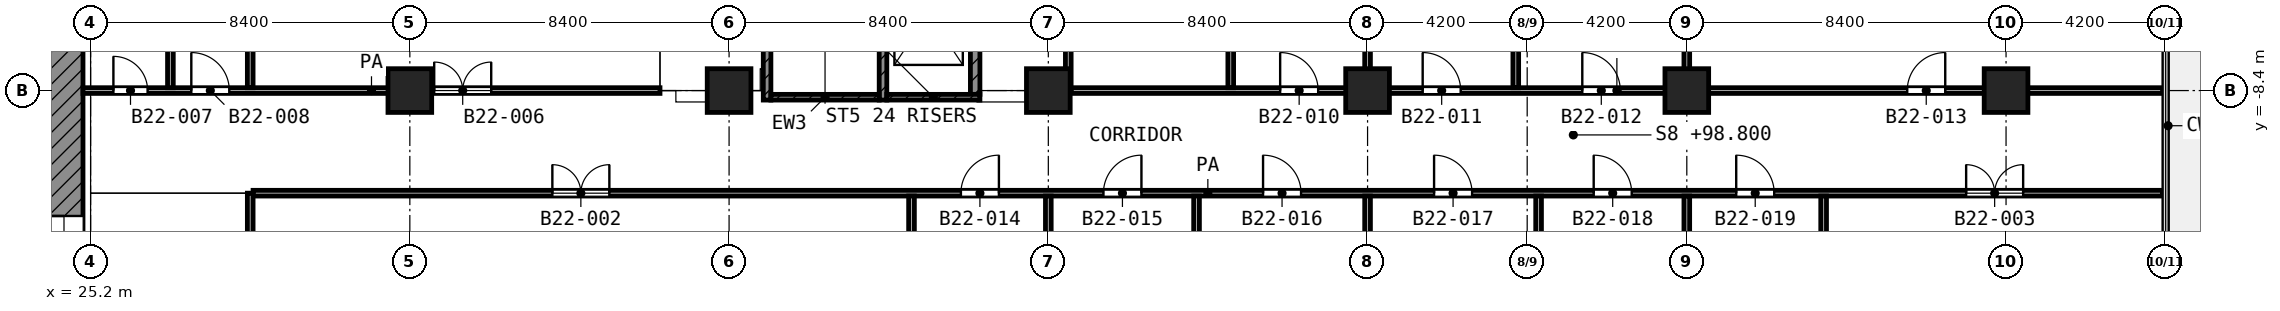
"""IFC4 building model, lengths in metres.
Left out: names, types, materials, properties, quantities, classifications, styles, units other than length and angle.
Written with IfcOpenShell. Run it as: python <this file> out.ifc"""

import sys

from ifc_helpers import new_model, si_unit, direction, frame, frame_2d, origin, origin_2d, place, context, subcontext, project, spatial, rectangle, extrude, element, fill, save


model = new_model("IFC4")
c1 = context("Model", 3, precision=1e-05, world=origin(), true_north=direction((0.0, 1.0)))
c2 = subcontext(c1, "Body", "Model", "MODEL_VIEW")
j1 = project(units=[si_unit("LENGTHUNIT", "METRE"), si_unit("PLANEANGLEUNIT", "RADIAN")], contexts=[c1])
p1 = place(None, origin())
s1 = spatial("IfcSite", under=j1, at=p1, CompositionType="ELEMENT")
p2 = place(p1, origin())
s2 = spatial("IfcBuilding", under=s1, at=p2, CompositionType="ELEMENT")
p3 = place(p2, frame((0.0, 0.0, 98.8)))
s3 = spatial("IfcBuildingStorey", under=s2, at=p3, CompositionType="ELEMENT", Elevation=98.8)
for number, where, z_axis, x_axis in (
    (1, (33.6, -8.4, 0.0), (0.0, 0.0, 1.0), (1.0, 0.0, 0.0)),
    (2, (42.0, -8.4, 0.0), (0.0, 0.0, 1.0), (1.0, 0.0, 0.0)),
    (3, (50.4, -8.4, 0.0), (0.0, 0.0, 1.0), (1.0, 0.0, 0.0)),
    (4, (58.8, -8.4, 0.0), (0.0, 0.0, 1.0), (1.0, 0.0, 0.0)),
    (5, (67.2, -8.4, 0.0), (0.0, 0.0, 1.0), (1.0, 0.0, 0.0)),
    (6, (75.6, -8.4, 0.0), (0.0, 0.0, 1.0), (1.0, 0.0, 0.0)),
):
    element("IfcColumn", number, at=place(p3, frame(where, z_axis=z_axis, x_axis=x_axis)), inside=s3, PredefinedType="COLUMN", context=c2, shape_type="SweptSolid", body=[
        extrude(rectangle(XDim=1.15, YDim=1.15, at=origin_2d()), origin(), (0.0, 0.0, 1.0), 4.2),
    ])
p4 = place(p3, frame((24.5, -24.0, 0.0), z_axis=(0.0, 0.0, 1.0), x_axis=(0.0, 1.0, 0.0)))
e7 = element("IfcWall", 7, at=p4, inside=s3, PredefinedType="SHEAR", context=c2, shape_type="SweptSolid", body=[
    extrude(rectangle(XDim=18.6, YDim=1.0, at=frame_2d((9.3, 0.0))), origin(), (0.0, 0.0, 1.0), 3.6),
])
p5 = place(p4, frame((10.5, 0.0, 0.0)))
e8 = element("IfcOpeningElement", 8, at=p5, cuts=e7, PredefinedType="OPENING", context=c2, shape_type="SweptSolid", body=[
    extrude(rectangle(XDim=1.8, YDim=2.1, at=frame_2d((0.9, 1.05))), frame((0.0, 0.51, 0.0), z_axis=(0.0, -1.0, 0.0), x_axis=(1.0, 0.0, 0.0)), (0.0, 0.0, 1.0), 1.02),
])
p6 = place(p3, frame((43.0, -8.65, 0.0), z_axis=(0.0, 0.0, 1.0), x_axis=(0.0, 1.0, 0.0)))
e9 = element("IfcWall", 9, at=p6, inside=s3, PredefinedType="SHEAR", context=c2, shape_type="SweptSolid", body=[
    extrude(rectangle(XDim=8.35, YDim=0.2, at=frame_2d((4.175, 0.0))), origin(), (0.0, 0.0, 1.0), 3.6),
])
p7 = place(p6, frame((7.0, 0.0, 0.0)))
e10 = element("IfcOpeningElement", 10, at=p7, cuts=e9, PredefinedType="OPENING", context=c2, shape_type="SweptSolid", body=[
    extrude(rectangle(XDim=1.1, YDim=2.1, at=frame_2d((0.55, 1.05))), frame((0.0, 0.11, 0.0), z_axis=(0.0, -1.0, 0.0), x_axis=(1.0, 0.0, 0.0)), (0.0, 0.0, 1.0), 0.22),
])
p8 = place(p3, frame((46.05, -8.65, 0.0), z_axis=(0.0, 0.0, 1.0), x_axis=(0.0, 1.0, 0.0)))
e11 = element("IfcWall", 11, at=p8, inside=s3, PredefinedType="SHEAR", context=c2, shape_type="SweptSolid", body=[
    extrude(rectangle(XDim=8.35, YDim=0.2, at=frame_2d((4.175, 0.0))), origin(), (0.0, 0.0, 1.0), 3.6),
])
p9 = place(p8, frame((7.0, 0.0, 0.0)))
e12 = element("IfcOpeningElement", 12, at=p9, cuts=e11, PredefinedType="OPENING", context=c2, shape_type="SweptSolid", body=[
    extrude(rectangle(XDim=1.1, YDim=2.1, at=frame_2d((0.55, 1.05))), frame((0.0, 0.11, 0.0), z_axis=(0.0, -1.0, 0.0), x_axis=(1.0, 0.0, 0.0)), (0.0, 0.0, 1.0), 0.22),
])
p10 = place(p3, frame((43.1, -8.575, 0.0), z_axis=(0.0, 0.0, 1.0), x_axis=(1.0, 0.0, 0.0)))
e13 = element("IfcWall", 13, at=p10, inside=s3, PredefinedType="SHEAR", context=c2, shape_type="SweptSolid", body=[
    extrude(rectangle(XDim=2.85, YDim=0.15, at=frame_2d((1.425, 0.0))), origin(), (0.0, 0.0, 1.0), 3.6),
])
p11 = place(p3, frame((46.15, -8.575, 0.0), z_axis=(0.0, 0.0, 1.0), x_axis=(1.0, 0.0, 0.0)))
e14 = element("IfcWall", 14, at=p11, inside=s3, PredefinedType="SHEAR", context=c2, shape_type="SweptSolid", body=[
    extrude(rectangle(XDim=2.45, YDim=0.15, at=frame_2d((1.225, 0.0))), origin(), (0.0, 0.0, 1.0), 3.6),
])
p12 = place(p3, frame((48.475, -8.5, 0.0), z_axis=(0.0, 0.0, 1.0), x_axis=(0.0, 1.0, 0.0)))
e15 = element("IfcWall", 15, at=p12, inside=s3, PredefinedType="SHEAR", context=c2, shape_type="SweptSolid", body=[
    extrude(rectangle(XDim=3.475, YDim=0.25, at=frame_2d((1.738, 0.0))), origin(), (0.0, 0.0, 1.0), 3.6),
])
p13 = place(p3, frame((29.475, -11.1, 0.0), z_axis=(0.0, 0.0, 1.0), x_axis=(1.0, 0.0, 0.0)))
e16 = element("IfcWall", 16, at=p13, inside=s3, PredefinedType="PARTITIONING", context=c2, shape_type="SweptSolid", body=[
    extrude(rectangle(XDim=50.245, YDim=0.15, at=frame_2d((25.123, 0.0))), origin(), (0.0, 0.0, 1.0), 3.6),
])
p14 = place(p13, frame((7.875, 0.0, 0.0)))
e17 = element("IfcOpeningElement", 17, at=p14, cuts=e16, PredefinedType="OPENING", context=c2, shape_type="SweptSolid", body=[
    extrude(rectangle(XDim=1.5, YDim=2.1, at=frame_2d((0.75, 1.05))), frame((0.0, 0.085, 0.0), z_axis=(0.0, -1.0, 0.0), x_axis=(1.0, 0.0, 0.0)), (0.0, 0.0, 1.0), 0.17),
])
p15 = place(p13, frame((18.625, 0.0, 0.0)))
e18 = element("IfcOpeningElement", 18, at=p15, cuts=e16, PredefinedType="OPENING", context=c2, shape_type="SweptSolid", body=[
    extrude(rectangle(XDim=1.0, YDim=2.1, at=frame_2d((0.5, 1.05))), frame((0.0, 0.085, 0.0), z_axis=(0.0, -1.0, 0.0), x_axis=(1.0, 0.0, 0.0)), (0.0, 0.0, 1.0), 0.17),
])
p16 = place(p13, frame((22.375, 0.0, 0.0)))
e19 = element("IfcOpeningElement", 19, at=p16, cuts=e16, PredefinedType="OPENING", context=c2, shape_type="SweptSolid", body=[
    extrude(rectangle(XDim=1.0, YDim=2.1, at=frame_2d((0.5, 1.05))), frame((0.0, 0.085, 0.0), z_axis=(0.0, -1.0, 0.0), x_axis=(1.0, 0.0, 0.0)), (0.0, 0.0, 1.0), 0.17),
])
p17 = place(p13, frame((26.575, 0.0, 0.0)))
e20 = element("IfcOpeningElement", 20, at=p17, cuts=e16, PredefinedType="OPENING", context=c2, shape_type="SweptSolid", body=[
    extrude(rectangle(XDim=1.0, YDim=2.1, at=frame_2d((0.5, 1.05))), frame((0.0, 0.085, 0.0), z_axis=(0.0, -1.0, 0.0), x_axis=(1.0, 0.0, 0.0)), (0.0, 0.0, 1.0), 0.17),
])
p18 = place(p13, frame((31.075, 0.0, 0.0)))
e21 = element("IfcOpeningElement", 21, at=p18, cuts=e16, PredefinedType="OPENING", context=c2, shape_type="SweptSolid", body=[
    extrude(rectangle(XDim=1.0, YDim=2.1, at=frame_2d((0.5, 1.05))), frame((0.0, 0.085, 0.0), z_axis=(0.0, -1.0, 0.0), x_axis=(1.0, 0.0, 0.0)), (0.0, 0.0, 1.0), 0.17),
])
p19 = place(p13, frame((35.275, 0.0, 0.0)))
e22 = element("IfcOpeningElement", 22, at=p19, cuts=e16, PredefinedType="OPENING", context=c2, shape_type="SweptSolid", body=[
    extrude(rectangle(XDim=1.0, YDim=2.1, at=frame_2d((0.5, 1.05))), frame((0.0, 0.085, 0.0), z_axis=(0.0, -1.0, 0.0), x_axis=(1.0, 0.0, 0.0)), (0.0, 0.0, 1.0), 0.17),
])
p20 = place(p13, frame((39.025, 0.0, 0.0)))
e23 = element("IfcOpeningElement", 23, at=p20, cuts=e16, PredefinedType="OPENING", context=c2, shape_type="SweptSolid", body=[
    extrude(rectangle(XDim=1.0, YDim=2.1, at=frame_2d((0.5, 1.05))), frame((0.0, 0.085, 0.0), z_axis=(0.0, -1.0, 0.0), x_axis=(1.0, 0.0, 0.0)), (0.0, 0.0, 1.0), 0.17),
])
p21 = place(p13, frame((45.075, 0.0, 0.0)))
e24 = element("IfcOpeningElement", 24, at=p21, cuts=e16, PredefinedType="OPENING", context=c2, shape_type="SweptSolid", body=[
    extrude(rectangle(XDim=1.5, YDim=2.1, at=frame_2d((0.75, 1.05))), frame((0.0, 0.085, 0.0), z_axis=(0.0, -1.0, 0.0), x_axis=(1.0, 0.0, 0.0)), (0.0, 0.0, 1.0), 0.17),
])
p22 = place(p3, frame((25.0, -8.4, 0.0), z_axis=(0.0, 0.0, 1.0), x_axis=(1.0, 0.0, 0.0)))
e25 = element("IfcWall", 25, at=p22, inside=s3, PredefinedType="PARTITIONING", context=c2, shape_type="SweptSolid", body=[
    extrude(rectangle(XDim=15.182, YDim=0.15, at=frame_2d((7.591, 0.0))), origin(), (0.0, 0.0, 1.0), 3.6),
])
p23 = place(p22, frame((0.8, 0.0, 0.0)))
e26 = element("IfcOpeningElement", 26, at=p23, cuts=e25, PredefinedType="OPENING", context=c2, shape_type="SweptSolid", body=[
    extrude(rectangle(XDim=0.9, YDim=2.1, at=frame_2d((0.45, 1.05))), frame((0.0, 0.085, 0.0), z_axis=(0.0, -1.0, 0.0), x_axis=(1.0, 0.0, 0.0)), (0.0, 0.0, 1.0), 0.17),
])
p24 = place(p22, frame((2.85, 0.0, 0.0)))
e27 = element("IfcOpeningElement", 27, at=p24, cuts=e25, PredefinedType="OPENING", context=c2, shape_type="SweptSolid", body=[
    extrude(rectangle(XDim=1.0, YDim=2.1, at=frame_2d((0.5, 1.05))), frame((0.0, 0.085, 0.0), z_axis=(0.0, -1.0, 0.0), x_axis=(1.0, 0.0, 0.0)), (0.0, 0.0, 1.0), 0.17),
])
p25 = place(p22, frame((9.241, 0.0, 0.0)))
e28 = element("IfcOpeningElement", 28, at=p25, cuts=e25, PredefinedType="OPENING", context=c2, shape_type="SweptSolid", body=[
    extrude(rectangle(XDim=1.5, YDim=2.1, at=frame_2d((0.75, 1.05))), frame((0.0, 0.085, 0.0), z_axis=(0.0, -1.0, 0.0), x_axis=(1.0, 0.0, 0.0)), (0.0, 0.0, 1.0), 0.17),
])
p26 = place(p3, frame((51.0, -8.4, 0.0), z_axis=(0.0, 0.0, 1.0), x_axis=(1.0, 0.0, 0.0)))
e29 = element("IfcWall", 29, at=p26, inside=s3, PredefinedType="PARTITIONING", context=c2, shape_type="SweptSolid", body=[
    extrude(rectangle(XDim=28.72, YDim=0.15, at=frame_2d((14.36, 0.0))), origin(), (0.0, 0.0, 1.0), 3.6),
])
p27 = place(p26, frame((5.5, 0.0, 0.0)))
e30 = element("IfcOpeningElement", 30, at=p27, cuts=e29, PredefinedType="OPENING", context=c2, shape_type="SweptSolid", body=[
    extrude(rectangle(XDim=1.0, YDim=2.1, at=frame_2d((0.5, 1.05))), frame((0.0, 0.085, 0.0), z_axis=(0.0, -1.0, 0.0), x_axis=(1.0, 0.0, 0.0)), (0.0, 0.0, 1.0), 0.17),
])
p28 = place(p26, frame((9.25, 0.0, 0.0)))
e31 = element("IfcOpeningElement", 31, at=p28, cuts=e29, PredefinedType="OPENING", context=c2, shape_type="SweptSolid", body=[
    extrude(rectangle(XDim=1.0, YDim=2.1, at=frame_2d((0.5, 1.05))), frame((0.0, 0.085, 0.0), z_axis=(0.0, -1.0, 0.0), x_axis=(1.0, 0.0, 0.0)), (0.0, 0.0, 1.0), 0.17),
])
p29 = place(p26, frame((13.45, 0.0, 0.0)))
e32 = element("IfcOpeningElement", 32, at=p29, cuts=e29, PredefinedType="OPENING", context=c2, shape_type="SweptSolid", body=[
    extrude(rectangle(XDim=1.0, YDim=2.1, at=frame_2d((0.5, 1.05))), frame((0.0, 0.085, 0.0), z_axis=(0.0, -1.0, 0.0), x_axis=(1.0, 0.0, 0.0)), (0.0, 0.0, 1.0), 0.17),
])
p30 = place(p26, frame((22.0, 0.0, 0.0)))
e33 = element("IfcOpeningElement", 33, at=p30, cuts=e29, PredefinedType="OPENING", context=c2, shape_type="SweptSolid", body=[
    extrude(rectangle(XDim=1.0, YDim=2.1, at=frame_2d((0.5, 1.05))), frame((0.0, 0.085, 0.0), z_axis=(0.0, -1.0, 0.0), x_axis=(1.0, 0.0, 0.0)), (0.0, 0.0, 1.0), 0.17),
])
p31 = place(p3, frame((27.3, -8.325, 0.0), z_axis=(0.0, 0.0, 1.0), x_axis=(0.0, 1.0, 0.0)))
e34 = element("IfcWall", 34, at=p31, inside=s3, PredefinedType="PARTITIONING", context=c2, shape_type="SweptSolid", body=[
    extrude(rectangle(XDim=8.25, YDim=0.15, at=frame_2d((4.125, 0.0))), origin(), (0.0, 0.0, 1.0), 3.6),
])
p32 = place(p3, frame((29.4, -25.2, 0.0), z_axis=(0.0, 0.0, 1.0), x_axis=(0.0, 1.0, 0.0)))
e35 = element("IfcWall", 35, at=p32, inside=s3, PredefinedType="PARTITIONING", context=c2, shape_type="SweptSolid", body=[
    extrude(rectangle(XDim=14.1, YDim=0.15, at=frame_2d((7.05, 0.0))), origin(), (0.0, 0.0, 1.0), 3.6),
])
p33 = place(p3, frame((29.4, -8.325, 0.0), z_axis=(0.0, 0.0, 1.0), x_axis=(0.0, 1.0, 0.0)))
e36 = element("IfcWall", 36, at=p33, inside=s3, PredefinedType="PARTITIONING", context=c2, shape_type="SweptSolid", body=[
    extrude(rectangle(XDim=8.323, YDim=0.15, at=frame_2d((4.162, 0.0))), origin(), (0.0, 0.0, 1.0), 3.6),
])
p34 = place(p3, frame((46.8, -25.12, 0.0), z_axis=(0.0, 0.0, 1.0), x_axis=(0.0, 1.0, 0.0)))
e37 = element("IfcWall", 37, at=p34, inside=s3, PredefinedType="PARTITIONING", context=c2, shape_type="SweptSolid", body=[
    extrude(rectangle(XDim=13.945, YDim=0.15, at=frame_2d((6.973, 0.0))), origin(), (0.0, 0.0, 1.0), 2.7),
])
p35 = place(p3, frame((50.4, -25.12, 0.0), z_axis=(0.0, 0.0, 1.0), x_axis=(0.0, 1.0, 0.0)))
e38 = element("IfcWall", 38, at=p35, inside=s3, PredefinedType="PARTITIONING", context=c2, shape_type="SweptSolid", body=[
    extrude(rectangle(XDim=13.945, YDim=0.15, at=frame_2d((6.973, 0.0))), origin(), (0.0, 0.0, 1.0), 3.6),
])
p36 = place(p3, frame((50.925, -8.4, 0.0), z_axis=(0.0, 0.0, 1.0), x_axis=(0.0, 1.0, 0.0)))
e39 = element("IfcWall", 39, at=p36, inside=s3, PredefinedType="PARTITIONING", context=c2, shape_type="SweptSolid", body=[
    extrude(rectangle(XDim=6.548, YDim=0.15, at=frame_2d((3.274, 0.0))), origin(), (0.0, 0.0, 1.0), 3.6),
])
p37 = place(p36, frame((2.774, 0.0, 0.0)))
e40 = element("IfcOpeningElement", 40, at=p37, cuts=e39, PredefinedType="OPENING", context=c2, shape_type="SweptSolid", body=[
    extrude(rectangle(XDim=1.0, YDim=2.1, at=frame_2d((0.5, 1.05))), frame((0.0, 0.085, 0.0), z_axis=(0.0, -1.0, 0.0), x_axis=(1.0, 0.0, 0.0)), (0.0, 0.0, 1.0), 0.17),
])
p38 = place(p3, frame((54.3, -25.12, 0.0), z_axis=(0.0, 0.0, 1.0), x_axis=(0.0, 1.0, 0.0)))
e41 = element("IfcWall", 41, at=p38, inside=s3, PredefinedType="PARTITIONING", context=c2, shape_type="SweptSolid", body=[
    extrude(rectangle(XDim=13.945, YDim=0.15, at=frame_2d((6.973, 0.0))), origin(), (0.0, 0.0, 1.0), 2.7),
])
p39 = place(p3, frame((55.2, -8.325, 0.0), z_axis=(0.0, 0.0, 1.0), x_axis=(0.0, 1.0, 0.0)))
e42 = element("IfcWall", 42, at=p39, inside=s3, PredefinedType="PARTITIONING", context=c2, shape_type="SweptSolid", body=[
    extrude(rectangle(XDim=8.25, YDim=0.15, at=frame_2d((4.125, 0.0))), origin(), (0.0, 0.0, 1.0), 3.6),
])
p40 = place(p3, frame((58.8, -25.12, 0.0), z_axis=(0.0, 0.0, 1.0), x_axis=(0.0, 1.0, 0.0)))
e43 = element("IfcWall", 43, at=p40, inside=s3, PredefinedType="PARTITIONING", context=c2, shape_type="SweptSolid", body=[
    extrude(rectangle(XDim=13.945, YDim=0.15, at=frame_2d((6.973, 0.0))), origin(), (0.0, 0.0, 1.0), 3.6),
])
p41 = place(p3, frame((58.8, -8.325, 0.0), z_axis=(0.0, 0.0, 1.0), x_axis=(0.0, 1.0, 0.0)))
e44 = element("IfcWall", 44, at=p41, inside=s3, PredefinedType="PARTITIONING", context=c2, shape_type="SweptSolid", body=[
    extrude(rectangle(XDim=8.322, YDim=0.15, at=frame_2d((4.161, 0.0))), origin(), (0.0, 0.0, 1.0), 3.6),
])
p42 = place(p3, frame((62.7, -8.325, 0.0), z_axis=(0.0, 0.0, 1.0), x_axis=(0.0, 1.0, 0.0)))
e45 = element("IfcWall", 45, at=p42, inside=s3, PredefinedType="PARTITIONING", context=c2, shape_type="SweptSolid", body=[
    extrude(rectangle(XDim=8.25, YDim=0.15, at=frame_2d((4.125, 0.0))), origin(), (0.0, 0.0, 1.0), 3.6),
])
p43 = place(p3, frame((63.3, -25.12, 0.0), z_axis=(0.0, 0.0, 1.0), x_axis=(0.0, 1.0, 0.0)))
e46 = element("IfcWall", 46, at=p43, inside=s3, PredefinedType="PARTITIONING", context=c2, shape_type="SweptSolid", body=[
    extrude(rectangle(XDim=13.945, YDim=0.15, at=frame_2d((6.973, 0.0))), origin(), (0.0, 0.0, 1.0), 2.7),
])
p44 = place(p3, frame((67.2, -25.12, 0.0), z_axis=(0.0, 0.0, 1.0), x_axis=(0.0, 1.0, 0.0)))
e47 = element("IfcWall", 47, at=p44, inside=s3, PredefinedType="PARTITIONING", context=c2, shape_type="SweptSolid", body=[
    extrude(rectangle(XDim=13.945, YDim=0.15, at=frame_2d((6.973, 0.0))), origin(), (0.0, 0.0, 1.0), 3.6),
])
p45 = place(p3, frame((67.2, -8.325, 0.0), z_axis=(0.0, 0.0, 1.0), x_axis=(0.0, 1.0, 0.0)))
e48 = element("IfcWall", 48, at=p45, inside=s3, PredefinedType="PARTITIONING", context=c2, shape_type="SweptSolid", body=[
    extrude(rectangle(XDim=8.325, YDim=0.15, at=frame_2d((4.163, 0.0))), origin(), (0.0, 0.0, 1.0), 3.6),
])
p46 = place(p3, frame((70.8, -25.12, 0.0), z_axis=(0.0, 0.0, 1.0), x_axis=(0.0, 1.0, 0.0)))
e49 = element("IfcWall", 49, at=p46, inside=s3, PredefinedType="PARTITIONING", context=c2, shape_type="SweptSolid", body=[
    extrude(rectangle(XDim=13.945, YDim=0.15, at=frame_2d((6.973, 0.0))), origin(), (0.0, 0.0, 1.0), 2.7),
])
p47 = place(p5, origin())
e50 = element("IfcDoor", 50, at=p47, inside=s3, OperationType="DOUBLE_DOOR_SINGLE_SWING", PredefinedType="DOOR", context=c2, shape_type="SweptSolid", body=[
    extrude(rectangle(XDim=1.8, YDim=2.1, at=frame_2d((0.9, 1.05))), frame((0.0, 0.025, 0.0), z_axis=(0.0, -1.0, 0.0), x_axis=(1.0, 0.0, 0.0)), (0.0, 0.0, 1.0), 0.05),
])
fill(e8, e50)
p48 = place(p27, origin())
e51 = element("IfcDoor", 51, at=p48, inside=s3, OperationType="SINGLE_SWING_LEFT", PredefinedType="DOOR", context=c2, shape_type="SweptSolid", body=[
    extrude(rectangle(XDim=1.0, YDim=2.1, at=frame_2d((0.5, 1.05))), frame((0.0, 0.025, 0.0), z_axis=(0.0, -1.0, 0.0), x_axis=(1.0, 0.0, 0.0)), (0.0, 0.0, 1.0), 0.05),
])
fill(e30, e51)
p49 = place(p28, origin())
e52 = element("IfcDoor", 52, at=p49, inside=s3, OperationType="SINGLE_SWING_LEFT", PredefinedType="DOOR", context=c2, shape_type="SweptSolid", body=[
    extrude(rectangle(XDim=1.0, YDim=2.1, at=frame_2d((0.5, 1.05))), frame((0.0, 0.025, 0.0), z_axis=(0.0, -1.0, 0.0), x_axis=(1.0, 0.0, 0.0)), (0.0, 0.0, 1.0), 0.05),
])
fill(e31, e52)
p50 = place(p29, origin())
e53 = element("IfcDoor", 53, at=p50, inside=s3, OperationType="SINGLE_SWING_LEFT", PredefinedType="DOOR", context=c2, shape_type="SweptSolid", body=[
    extrude(rectangle(XDim=1.0, YDim=2.1, at=frame_2d((0.5, 1.05))), frame((0.0, 0.025, 0.0), z_axis=(0.0, -1.0, 0.0), x_axis=(1.0, 0.0, 0.0)), (0.0, 0.0, 1.0), 0.05),
])
fill(e32, e53)
p51 = place(p30, origin())
e54 = element("IfcDoor", 54, at=p51, inside=s3, OperationType="SINGLE_SWING_RIGHT", PredefinedType="DOOR", context=c2, shape_type="SweptSolid", body=[
    extrude(rectangle(XDim=1.0, YDim=2.1, at=frame_2d((0.5, 1.05))), frame((0.0, 0.025, 0.0), z_axis=(0.0, -1.0, 0.0), x_axis=(1.0, 0.0, 0.0)), (0.0, 0.0, 1.0), 0.05),
])
fill(e33, e54)
p52 = place(p14, origin())
e55 = element("IfcDoor", 55, at=p52, inside=s3, OperationType="DOUBLE_DOOR_SINGLE_SWING", PredefinedType="DOOR", context=c2, shape_type="SweptSolid", body=[
    extrude(rectangle(XDim=1.5, YDim=2.1, at=frame_2d((0.75, 1.05))), frame((0.0, 0.025, 0.0), z_axis=(0.0, -1.0, 0.0), x_axis=(1.0, 0.0, 0.0)), (0.0, 0.0, 1.0), 0.05),
])
fill(e17, e55)
p53 = place(p15, origin())
e56 = element("IfcDoor", 56, at=p53, inside=s3, OperationType="SINGLE_SWING_RIGHT", PredefinedType="DOOR", context=c2, shape_type="SweptSolid", body=[
    extrude(rectangle(XDim=1.0, YDim=2.1, at=frame_2d((0.5, 1.05))), frame((0.0, 0.025, 0.0), z_axis=(0.0, -1.0, 0.0), x_axis=(1.0, 0.0, 0.0)), (0.0, 0.0, 1.0), 0.05),
])
fill(e18, e56)
p54 = place(p16, origin())
e57 = element("IfcDoor", 57, at=p54, inside=s3, OperationType="SINGLE_SWING_RIGHT", PredefinedType="DOOR", context=c2, shape_type="SweptSolid", body=[
    extrude(rectangle(XDim=1.0, YDim=2.1, at=frame_2d((0.5, 1.05))), frame((0.0, 0.025, 0.0), z_axis=(0.0, -1.0, 0.0), x_axis=(1.0, 0.0, 0.0)), (0.0, 0.0, 1.0), 0.05),
])
fill(e19, e57)
p55 = place(p17, origin())
e58 = element("IfcDoor", 58, at=p55, inside=s3, OperationType="SINGLE_SWING_LEFT", PredefinedType="DOOR", context=c2, shape_type="SweptSolid", body=[
    extrude(rectangle(XDim=1.0, YDim=2.1, at=frame_2d((0.5, 1.05))), frame((0.0, 0.025, 0.0), z_axis=(0.0, -1.0, 0.0), x_axis=(1.0, 0.0, 0.0)), (0.0, 0.0, 1.0), 0.05),
])
fill(e20, e58)
p56 = place(p18, origin())
e59 = element("IfcDoor", 59, at=p56, inside=s3, OperationType="SINGLE_SWING_LEFT", PredefinedType="DOOR", context=c2, shape_type="SweptSolid", body=[
    extrude(rectangle(XDim=1.0, YDim=2.1, at=frame_2d((0.5, 1.05))), frame((0.0, 0.025, 0.0), z_axis=(0.0, -1.0, 0.0), x_axis=(1.0, 0.0, 0.0)), (0.0, 0.0, 1.0), 0.05),
])
fill(e21, e59)
p57 = place(p19, origin())
e60 = element("IfcDoor", 60, at=p57, inside=s3, OperationType="SINGLE_SWING_LEFT", PredefinedType="DOOR", context=c2, shape_type="SweptSolid", body=[
    extrude(rectangle(XDim=1.0, YDim=2.1, at=frame_2d((0.5, 1.05))), frame((0.0, 0.025, 0.0), z_axis=(0.0, -1.0, 0.0), x_axis=(1.0, 0.0, 0.0)), (0.0, 0.0, 1.0), 0.05),
])
fill(e22, e60)
p58 = place(p20, origin())
e61 = element("IfcDoor", 61, at=p58, inside=s3, OperationType="SINGLE_SWING_LEFT", PredefinedType="DOOR", context=c2, shape_type="SweptSolid", body=[
    extrude(rectangle(XDim=1.0, YDim=2.1, at=frame_2d((0.5, 1.05))), frame((0.0, 0.025, 0.0), z_axis=(0.0, -1.0, 0.0), x_axis=(1.0, 0.0, 0.0)), (0.0, 0.0, 1.0), 0.05),
])
fill(e23, e61)
p59 = place(p21, origin())
e62 = element("IfcDoor", 62, at=p59, inside=s3, OperationType="DOUBLE_DOOR_SINGLE_SWING", PredefinedType="DOOR", context=c2, shape_type="SweptSolid", body=[
    extrude(rectangle(XDim=1.5, YDim=2.1, at=frame_2d((0.75, 1.05))), frame((0.0, 0.025, 0.0), z_axis=(0.0, -1.0, 0.0), x_axis=(1.0, 0.0, 0.0)), (0.0, 0.0, 1.0), 0.05),
])
fill(e24, e62)
p60 = place(p23, origin())
e63 = element("IfcDoor", 63, at=p60, inside=s3, OperationType="SINGLE_SWING_LEFT", PredefinedType="DOOR", context=c2, shape_type="SweptSolid", body=[
    extrude(rectangle(XDim=0.9, YDim=2.1, at=frame_2d((0.45, 1.05))), frame((0.0, 0.025, 0.0), z_axis=(0.0, -1.0, 0.0), x_axis=(1.0, 0.0, 0.0)), (0.0, 0.0, 1.0), 0.05),
])
fill(e26, e63)
p61 = place(p24, origin())
e64 = element("IfcDoor", 64, at=p61, inside=s3, OperationType="SINGLE_SWING_LEFT", PredefinedType="DOOR", context=c2, shape_type="SweptSolid", body=[
    extrude(rectangle(XDim=1.0, YDim=2.1, at=frame_2d((0.5, 1.05))), frame((0.0, 0.025, 0.0), z_axis=(0.0, -1.0, 0.0), x_axis=(1.0, 0.0, 0.0)), (0.0, 0.0, 1.0), 0.05),
])
fill(e27, e64)
p62 = place(p25, origin())
e65 = element("IfcDoor", 65, at=p62, inside=s3, OperationType="DOUBLE_DOOR_SINGLE_SWING", PredefinedType="DOOR", context=c2, shape_type="SweptSolid", body=[
    extrude(rectangle(XDim=1.5, YDim=2.1, at=frame_2d((0.75, 1.05))), frame((0.0, 0.025, 0.0), z_axis=(0.0, -1.0, 0.0), x_axis=(1.0, 0.0, 0.0)), (0.0, 0.0, 1.0), 0.05),
])
fill(e28, e65)
save(model, sys.argv[1])
